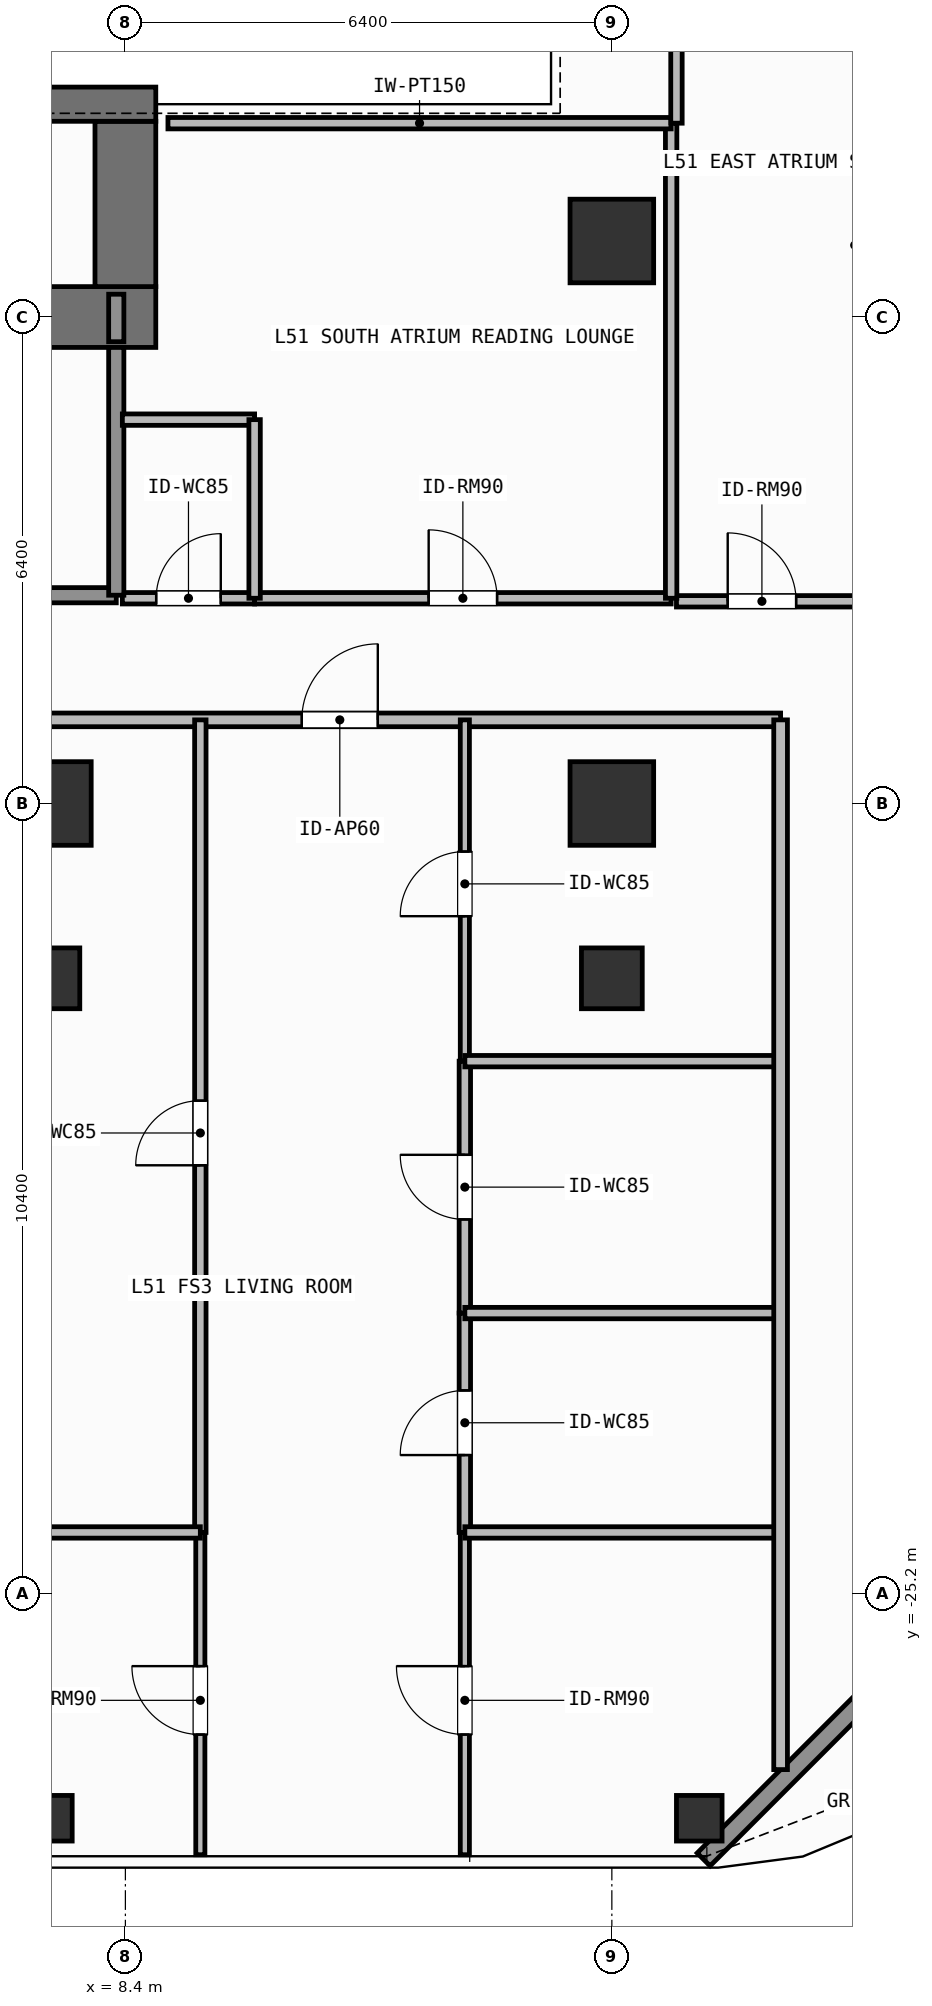
"""IFC4 building model, lengths in metres.
Left out: names, types, materials, properties, quantities, classifications, styles, units other than length and angle.
Written with IfcOpenShell. Run it as: python <this file> out.ifc"""

import sys

from ifc_helpers import new_model, si_unit, direction, frame, frame_2d, origin, origin_2d, place, context, subcontext, project, spatial, rectangle, hollow_rectangle, extrude, element, fill, save


model = new_model("IFC4")
c1 = context("Model", 3, precision=1e-05, world=origin(), true_north=direction((0.0, 1.0)))
c2 = subcontext(c1, "Body", "Model", "MODEL_VIEW")
j1 = project(units=[si_unit("LENGTHUNIT", "METRE"), si_unit("PLANEANGLEUNIT", "RADIAN")], contexts=[c1])
p1 = place(None, origin())
s1 = spatial("IfcSite", under=j1, at=p1, CompositionType="ELEMENT")
p2 = place(p1, origin())
s2 = spatial("IfcBuilding", under=s1, at=p2, CompositionType="ELEMENT")
p3 = place(p2, frame((0.0, 0.0, 207.0)))
s3 = spatial("IfcBuildingStorey", under=s2, at=p3, CompositionType="ELEMENT", Elevation=207.0)
p4 = place(p3, frame((6.12, -8.4, 0.0), z_axis=(0.0, 0.0, 1.0), x_axis=(1.0, 0.0, 0.0)))
e1 = element("IfcWall", 1, at=p4, inside=s3, PredefinedType="SHEAR", context=c2, shape_type="SweptSolid", body=[
    extrude(rectangle(XDim=2.68, YDim=0.8, at=frame_2d((1.34, 0.0))), origin(), (0.0, 0.0, 1.0), 3.9),
])
p5 = place(p3, frame((8.4, -8.0, 0.0), z_axis=(0.0, 0.0, 1.0), x_axis=(0.0, 1.0, 0.0)))
e2 = element("IfcWall", 2, at=p5, inside=s3, PredefinedType="SHEAR", context=c2, shape_type="SweptSolid", body=[
    extrude(rectangle(XDim=2.175, YDim=0.8, at=frame_2d((1.087, 0.0))), origin(), (0.0, 0.0, 1.0), 3.9),
])
p6 = place(p3, frame((3.045, -5.6, 0.0), z_axis=(0.0, 0.0, 1.0), x_axis=(1.0, 0.0, 0.0)))
e3 = element("IfcWall", 3, at=p6, inside=s3, PredefinedType="SHEAR", context=c2, shape_type="SweptSolid", body=[
    extrude(rectangle(XDim=5.755, YDim=0.45, at=frame_2d((2.877, 0.0))), origin(), (0.0, 0.0, 1.0), 3.9),
])
for number, where, z_axis, x_axis in (
    (4, (7.4, -14.8, 0.0), (0.0, 0.0, 1.0), (1.0, 0.0, 0.0)),
    (5, (14.8, -14.8, 0.0), (0.0, 0.0, 1.0), (1.0, 0.0, 0.0)),
    (6, (14.8, -7.4, 0.0), (0.0, 0.0, 1.0), (1.0, 0.0, 0.0)),
):
    element("IfcColumn", number, at=place(p3, frame(where, z_axis=z_axis, x_axis=x_axis)), inside=s3, PredefinedType="COLUMN", context=c2, shape_type="SweptSolid", body=[
        extrude(rectangle(XDim=1.1, YDim=1.1, at=origin_2d()), origin(), (0.0, 0.0, 1.0), 3.9),
    ])
for number, where, z_axis, x_axis in (
    (7, (7.4, -17.1, 0.0), (0.0, 0.0, 1.0), (1.0, 0.0, 0.0)),
    (8, (14.8, -17.1, 0.0), (0.0, 0.0, 1.0), (1.0, 0.0, 0.0)),
):
    element("IfcColumn", number, at=place(p3, frame(where, z_axis=z_axis, x_axis=x_axis)), inside=s3, PredefinedType="COLUMN", context=c2, shape_type="SweptSolid", body=[
        extrude(hollow_rectangle(XDim=0.8, YDim=0.8, WallThickness=0.036, at=origin_2d()), origin(), (0.0, 0.0, 1.0), 3.9),
    ])
for number, where, z_axis, x_axis in (
    (9, (15.95, -28.15, 0.0), (0.0, 0.0, 1.0), (1.0, 0.0, 0.0)),
    (10, (7.4, -28.15, 0.0), (0.0, 0.0, 1.0), (1.0, 0.0, 0.0)),
):
    element("IfcColumn", number, at=place(p3, frame(where, z_axis=z_axis, x_axis=x_axis)), inside=s3, PredefinedType="COLUMN", context=c2, shape_type="SweptSolid", body=[
        extrude(hollow_rectangle(XDim=0.6, YDim=0.6, WallThickness=0.028, at=origin_2d()), origin(), (0.0, 0.0, 1.0), 3.9),
    ])
p7 = place(p3, frame((20.392, -24.308, 0.0), z_axis=(0.0, 0.0, 1.0), x_axis=(-0.707106781187, -0.707106781187, 0.0)))
e11 = element("IfcWall", 11, at=p7, inside=s3, PredefinedType="SOLIDWALL", context=c2, shape_type="SweptSolid", body=[
    extrude(rectangle(XDim=6.201, YDim=0.24, at=frame_2d((3.101, 0.0))), origin(), (0.0, 0.0, 1.0), 3.62),
])
p8 = place(p3, frame((4.58, -12.06, 0.0), z_axis=(0.0, 0.0, 1.0), x_axis=(1.0, 0.0, 0.0)))
e12 = element("IfcWall", 12, at=p8, inside=s3, PredefinedType="SOLIDWALL", context=c2, shape_type="SweptSolid", body=[
    extrude(rectangle(XDim=3.7, YDim=0.2, at=frame_2d((1.85, 0.0))), origin(), (0.0, 0.0, 1.0), 3.62),
])
p9 = place(p8, frame((1.212, 0.0, 0.0)))
e13 = element("IfcOpeningElement", 13, at=p9, cuts=e12, PredefinedType="OPENING", context=c2, shape_type="SweptSolid", body=[
    extrude(rectangle(XDim=1.1, YDim=2.15, at=frame_2d((0.55, 1.075))), frame((0.0, 0.11, 0.0), z_axis=(0.0, -1.0, 0.0), x_axis=(1.0, 0.0, 0.0)), (0.0, 0.0, 1.0), 0.22),
])
p10 = place(p3, frame((8.36, -12.1, 0.0), z_axis=(0.0, 0.0, 1.0), x_axis=(1.0, 0.0, 0.0)))
e14 = element("IfcWall", 14, at=p10, inside=s3, PredefinedType="PARTITIONING", context=c2, shape_type="SweptSolid", body=[
    extrude(rectangle(XDim=1.74, YDim=0.15, at=frame_2d((0.87, 0.0))), origin(), (0.0, 0.0, 1.0), 3.62),
])
p11 = place(p10, frame((0.445, 0.0, 0.0)))
e15 = element("IfcOpeningElement", 15, at=p11, cuts=e14, PredefinedType="OPENING", context=c2, shape_type="SweptSolid", body=[
    extrude(rectangle(XDim=0.85, YDim=2.1, at=frame_2d((0.425, 1.05))), frame((0.0, 0.085, 0.0), z_axis=(0.0, -1.0, 0.0), x_axis=(1.0, 0.0, 0.0)), (0.0, 0.0, 1.0), 0.17),
])
p12 = place(p3, frame((10.1, -12.1, 0.0), z_axis=(0.0, 0.0, 1.0), x_axis=(1.0, 0.0, 0.0)))
e16 = element("IfcWall", 16, at=p12, inside=s3, PredefinedType="PARTITIONING", context=c2, shape_type="SweptSolid", body=[
    extrude(rectangle(XDim=5.48, YDim=0.15, at=frame_2d((2.74, 0.0))), origin(), (0.0, 0.0, 1.0), 3.62),
])
p13 = place(p12, frame((2.29, 0.0, 0.0)))
e17 = element("IfcOpeningElement", 17, at=p13, cuts=e16, PredefinedType="OPENING", context=c2, shape_type="SweptSolid", body=[
    extrude(rectangle(XDim=0.9, YDim=2.1, at=frame_2d((0.45, 1.05))), frame((0.0, 0.085, 0.0), z_axis=(0.0, -1.0, 0.0), x_axis=(1.0, 0.0, 0.0)), (0.0, 0.0, 1.0), 0.17),
])
p14 = place(p3, frame((5.599, -13.7, 0.0), z_axis=(0.0, 0.0, 1.0), x_axis=(1.0, 0.0, 0.0)))
e18 = element("IfcWall", 18, at=p14, inside=s3, PredefinedType="PARTITIONING", context=c2, shape_type="SweptSolid", body=[
    extrude(rectangle(XDim=11.421, YDim=0.18, at=frame_2d((5.71, 0.0))), origin(), (0.0, 0.0, 1.0), 3.62),
])
p15 = place(p14, frame((5.122, 0.0, 0.0)))
e19 = element("IfcOpeningElement", 19, at=p15, cuts=e18, PredefinedType="OPENING", context=c2, shape_type="SweptSolid", body=[
    extrude(rectangle(XDim=1.0, YDim=2.2, at=frame_2d((0.5, 1.1))), frame((0.0, 0.1, 0.0), z_axis=(0.0, -1.0, 0.0), x_axis=(1.0, 0.0, 0.0)), (0.0, 0.0, 1.0), 0.2),
])
p16 = place(p3, frame((9.386, -24.39, 0.0), z_axis=(0.0, 0.0, 1.0), x_axis=(0.0, 1.0, 0.0)))
e20 = element("IfcWall", 20, at=p16, inside=s3, PredefinedType="PARTITIONING", context=c2, shape_type="SweptSolid", body=[
    extrude(rectangle(XDim=10.69, YDim=0.15, at=frame_2d((5.345, 0.0))), origin(), (0.0, 0.0, 1.0), 3.62),
])
p17 = place(p16, frame((4.83, 0.0, 0.0)))
e21 = element("IfcOpeningElement", 21, at=p17, cuts=e20, PredefinedType="OPENING", context=c2, shape_type="SweptSolid", body=[
    extrude(rectangle(XDim=0.85, YDim=2.1, at=frame_2d((0.425, 1.05))), frame((0.0, 0.085, 0.0), z_axis=(0.0, -1.0, 0.0), x_axis=(1.0, 0.0, 0.0)), (0.0, 0.0, 1.0), 0.17),
])
p18 = place(p3, frame((9.386, -28.63, 0.0), z_axis=(0.0, 0.0, 1.0), x_axis=(0.0, 1.0, 0.0)))
e22 = element("IfcWall", 22, at=p18, inside=s3, PredefinedType="PARTITIONING", context=c2, shape_type="SweptSolid", body=[
    extrude(rectangle(XDim=4.24, YDim=0.12, at=frame_2d((2.12, 0.0))), origin(), (0.0, 0.0, 1.0), 3.62),
])
p19 = place(p18, frame((1.581, 0.0, 0.0)))
e23 = element("IfcOpeningElement", 23, at=p19, cuts=e22, PredefinedType="OPENING", context=c2, shape_type="SweptSolid", body=[
    extrude(rectangle(XDim=0.9, YDim=2.1, at=frame_2d((0.45, 1.05))), frame((0.0, 0.07, 0.0), z_axis=(0.0, -1.0, 0.0), x_axis=(1.0, 0.0, 0.0)), (0.0, 0.0, 1.0), 0.14),
])
p20 = place(p3, frame((12.866, -24.39, 0.0), z_axis=(0.0, 0.0, 1.0), x_axis=(0.0, 1.0, 0.0)))
e24 = element("IfcWall", 24, at=p20, inside=s3, PredefinedType="PARTITIONING", context=c2, shape_type="SweptSolid", body=[
    extrude(rectangle(XDim=2.886, YDim=0.15, at=frame_2d((1.443, 0.0))), origin(), (0.0, 0.0, 1.0), 3.62),
])
p21 = place(p20, frame((1.018, 0.0, 0.0)))
e25 = element("IfcOpeningElement", 25, at=p21, cuts=e24, PredefinedType="OPENING", context=c2, shape_type="SweptSolid", body=[
    extrude(rectangle(XDim=0.85, YDim=2.1, at=frame_2d((0.425, 1.05))), frame((0.0, 0.085, 0.0), z_axis=(0.0, -1.0, 0.0), x_axis=(1.0, 0.0, 0.0)), (0.0, 0.0, 1.0), 0.17),
])
p22 = place(p3, frame((12.866, -21.504, 0.0), z_axis=(0.0, 0.0, 1.0), x_axis=(0.0, 1.0, 0.0)))
e26 = element("IfcWall", 26, at=p22, inside=s3, PredefinedType="PARTITIONING", context=c2, shape_type="SweptSolid", body=[
    extrude(rectangle(XDim=3.314, YDim=0.15, at=frame_2d((1.657, 0.0))), origin(), (0.0, 0.0, 1.0), 3.62),
])
p23 = place(p22, frame((1.232, 0.0, 0.0)))
e27 = element("IfcOpeningElement", 27, at=p23, cuts=e26, PredefinedType="OPENING", context=c2, shape_type="SweptSolid", body=[
    extrude(rectangle(XDim=0.85, YDim=2.1, at=frame_2d((0.425, 1.05))), frame((0.0, 0.085, 0.0), z_axis=(0.0, -1.0, 0.0), x_axis=(1.0, 0.0, 0.0)), (0.0, 0.0, 1.0), 0.17),
])
p24 = place(p3, frame((12.866, -18.19, 0.0), z_axis=(0.0, 0.0, 1.0), x_axis=(0.0, 1.0, 0.0)))
e28 = element("IfcWall", 28, at=p24, inside=s3, PredefinedType="PARTITIONING", context=c2, shape_type="SweptSolid", body=[
    extrude(rectangle(XDim=4.49, YDim=0.12, at=frame_2d((2.245, 0.0))), origin(), (0.0, 0.0, 1.0), 3.62),
])
p25 = place(p24, frame((1.907, 0.0, 0.0)))
e29 = element("IfcOpeningElement", 29, at=p25, cuts=e28, PredefinedType="OPENING", context=c2, shape_type="SweptSolid", body=[
    extrude(rectangle(XDim=0.85, YDim=2.1, at=frame_2d((0.425, 1.05))), frame((0.0, 0.07, 0.0), z_axis=(0.0, -1.0, 0.0), x_axis=(1.0, 0.0, 0.0)), (0.0, 0.0, 1.0), 0.14),
])
p26 = place(p3, frame((12.866, -28.63, 0.0), z_axis=(0.0, 0.0, 1.0), x_axis=(0.0, 1.0, 0.0)))
e30 = element("IfcWall", 30, at=p26, inside=s3, PredefinedType="PARTITIONING", context=c2, shape_type="SweptSolid", body=[
    extrude(rectangle(XDim=4.24, YDim=0.12, at=frame_2d((2.12, 0.0))), origin(), (0.0, 0.0, 1.0), 3.62),
])
p27 = place(p26, frame((1.581, 0.0, 0.0)))
e31 = element("IfcOpeningElement", 31, at=p27, cuts=e30, PredefinedType="OPENING", context=c2, shape_type="SweptSolid", body=[
    extrude(rectangle(XDim=0.9, YDim=2.1, at=frame_2d((0.45, 1.05))), frame((0.0, 0.07, 0.0), z_axis=(0.0, -1.0, 0.0), x_axis=(1.0, 0.0, 0.0)), (0.0, 0.0, 1.0), 0.14),
])
p28 = place(p3, frame((15.65, -12.14, 0.0), z_axis=(0.0, 0.0, 1.0), x_axis=(1.0, 0.0, 0.0)))
e32 = element("IfcWall", 32, at=p28, inside=s3, PredefinedType="PARTITIONING", context=c2, shape_type="SweptSolid", body=[
    extrude(rectangle(XDim=2.42, YDim=0.15, at=frame_2d((1.21, 0.0))), origin(), (0.0, 0.0, 1.0), 3.62),
])
p29 = place(p28, frame((0.674, 0.0, 0.0)))
e33 = element("IfcOpeningElement", 33, at=p29, cuts=e32, PredefinedType="OPENING", context=c2, shape_type="SweptSolid", body=[
    extrude(rectangle(XDim=0.9, YDim=2.1, at=frame_2d((0.45, 1.05))), frame((0.0, 0.085, 0.0), z_axis=(0.0, -1.0, 0.0), x_axis=(1.0, 0.0, 0.0)), (0.0, 0.0, 1.0), 0.17),
])
p30 = place(p3, frame((8.28, -12.06, 0.0), z_axis=(0.0, 0.0, 1.0), x_axis=(0.0, 1.0, 0.0)))
e34 = element("IfcWall", 34, at=p30, inside=s3, PredefinedType="SOLIDWALL", context=c2, shape_type="SweptSolid", body=[
    extrude(rectangle(XDim=3.26, YDim=0.2, at=frame_2d((1.63, 0.0))), origin(), (0.0, 0.0, 1.0), 3.62),
])
p31 = place(p3, frame((8.28, -8.725, 0.0), z_axis=(0.0, 0.0, 1.0), x_axis=(0.0, 1.0, 0.0)))
e35 = element("IfcWall", 35, at=p31, inside=s3, PredefinedType="SOLIDWALL", context=c2, shape_type="SweptSolid", body=[
    extrude(rectangle(XDim=0.625, YDim=0.2, at=frame_2d((0.312, 0.0))), origin(), (0.0, 0.0, 1.0), 3.62),
])
p32 = place(p3, frame((8.36, -9.75, 0.0), z_axis=(0.0, 0.0, 1.0), x_axis=(1.0, 0.0, 0.0)))
e36 = element("IfcWall", 36, at=p32, inside=s3, PredefinedType="PARTITIONING", context=c2, shape_type="SweptSolid", body=[
    extrude(rectangle(XDim=1.74, YDim=0.15, at=frame_2d((0.87, 0.0))), origin(), (0.0, 0.0, 1.0), 3.62),
])
p33 = place(p3, frame((10.1, -12.1, 0.0), z_axis=(0.0, 0.0, 1.0), x_axis=(0.0, 1.0, 0.0)))
e37 = element("IfcWall", 37, at=p33, inside=s3, PredefinedType="PARTITIONING", context=c2, shape_type="SweptSolid", body=[
    extrude(rectangle(XDim=2.35, YDim=0.15, at=frame_2d((1.175, 0.0))), origin(), (0.0, 0.0, 1.0), 3.62),
])
p34 = place(p3, frame((15.58, -12.1, 0.0), z_axis=(0.0, 0.0, 1.0), x_axis=(0.0, 1.0, 0.0)))
e38 = element("IfcWall", 38, at=p34, inside=s3, PredefinedType="PARTITIONING", context=c2, shape_type="SweptSolid", body=[
    extrude(rectangle(XDim=6.25, YDim=0.15, at=frame_2d((3.125, 0.0))), origin(), (0.0, 0.0, 1.0), 3.62),
])
p35 = place(p3, frame((8.96, -5.85, 0.0), z_axis=(0.0, 0.0, 1.0), x_axis=(1.0, 0.0, 0.0)))
e39 = element("IfcWall", 39, at=p35, inside=s3, PredefinedType="PARTITIONING", context=c2, shape_type="SweptSolid", body=[
    extrude(rectangle(XDim=6.62, YDim=0.15, at=frame_2d((3.31, 0.0))), origin(), (0.0, 0.0, 1.0), 3.62),
])
p36 = place(p3, frame((5.599, -24.39, 0.0), z_axis=(0.0, 0.0, 1.0), x_axis=(1.0, 0.0, 0.0)))
e40 = element("IfcWall", 40, at=p36, inside=s3, PredefinedType="PARTITIONING", context=c2, shape_type="SweptSolid", body=[
    extrude(rectangle(XDim=3.787, YDim=0.15, at=frame_2d((1.894, 0.0))), origin(), (0.0, 0.0, 1.0), 3.62),
])
p37 = place(p3, frame((12.866, -21.504, 0.0), z_axis=(0.0, 0.0, 1.0), x_axis=(1.0, 0.0, 0.0)))
e41 = element("IfcWall", 41, at=p37, inside=s3, PredefinedType="PARTITIONING", context=c2, shape_type="SweptSolid", body=[
    extrude(rectangle(XDim=4.154, YDim=0.15, at=frame_2d((2.077, 0.0))), origin(), (0.0, 0.0, 1.0), 3.36),
])
for number, where, z_axis, x_axis in (
    (42, (12.866, -18.19, 0.0), (0.0, 0.0, 1.0), (1.0, 0.0, 0.0)),
    (43, (12.866, -24.39, 0.0), (0.0, 0.0, 1.0), (1.0, 0.0, 0.0)),
):
    element("IfcWall", number, at=place(p3, frame(where, z_axis=z_axis, x_axis=x_axis)), inside=s3, PredefinedType="PARTITIONING", context=c2, shape_type="SweptSolid", body=[
        extrude(rectangle(XDim=4.154, YDim=0.15, at=frame_2d((2.077, 0.0))), origin(), (0.0, 0.0, 1.0), 3.62),
    ])
p38 = place(p3, frame((17.02, -27.51, 0.0), z_axis=(0.0, 0.0, 1.0), x_axis=(0.0, 1.0, 0.0)))
e44 = element("IfcWall", 44, at=p38, inside=s3, PredefinedType="PARTITIONING", context=c2, shape_type="SweptSolid", body=[
    extrude(rectangle(XDim=13.81, YDim=0.18, at=frame_2d((6.905, 0.0))), origin(), (0.0, 0.0, 1.0), 3.62),
])
p39 = place(p3, frame((15.65, -5.85, 0.0), z_axis=(0.0, 0.0, 1.0), x_axis=(0.0, 1.0, 0.0)))
e45 = element("IfcWall", 45, at=p39, inside=s3, PredefinedType="PARTITIONING", context=c2, shape_type="SweptSolid", body=[
    extrude(rectangle(XDim=3.1, YDim=0.15, at=frame_2d((1.55, 0.0))), origin(), (0.0, 0.0, 1.0), 3.62),
])
p40 = place(p11, origin())
e46 = element("IfcDoor", 46, at=p40, inside=s3, OperationType="SINGLE_SWING_RIGHT", PredefinedType="DOOR", context=c2, shape_type="SweptSolid", body=[
    extrude(rectangle(XDim=0.85, YDim=2.1, at=frame_2d((0.425, 1.05))), frame((0.0, 0.025, 0.0), z_axis=(0.0, -1.0, 0.0), x_axis=(1.0, 0.0, 0.0)), (0.0, 0.0, 1.0), 0.05),
])
fill(e15, e46)
p41 = place(p13, origin())
e47 = element("IfcDoor", 47, at=p41, inside=s3, OperationType="SINGLE_SWING_LEFT", PredefinedType="DOOR", context=c2, shape_type="SweptSolid", body=[
    extrude(rectangle(XDim=0.9, YDim=2.1, at=frame_2d((0.45, 1.05))), frame((0.0, 0.025, 0.0), z_axis=(0.0, -1.0, 0.0), x_axis=(1.0, 0.0, 0.0)), (0.0, 0.0, 1.0), 0.05),
])
fill(e17, e47)
p42 = place(p15, origin())
e48 = element("IfcDoor", 48, at=p42, inside=s3, OperationType="SINGLE_SWING_RIGHT", PredefinedType="DOOR", context=c2, shape_type="SweptSolid", body=[
    extrude(rectangle(XDim=1.0, YDim=2.2, at=frame_2d((0.5, 1.1))), frame((0.0, 0.025, 0.0), z_axis=(0.0, -1.0, 0.0), x_axis=(1.0, 0.0, 0.0)), (0.0, 0.0, 1.0), 0.05),
])
fill(e19, e48)
p43 = place(p17, origin())
e49 = element("IfcDoor", 49, at=p43, inside=s3, OperationType="SINGLE_SWING_LEFT", PredefinedType="DOOR", context=c2, shape_type="SweptSolid", body=[
    extrude(rectangle(XDim=0.85, YDim=2.1, at=frame_2d((0.425, 1.05))), frame((0.0, 0.025, 0.0), z_axis=(0.0, -1.0, 0.0), x_axis=(1.0, 0.0, 0.0)), (0.0, 0.0, 1.0), 0.05),
])
fill(e21, e49)
p44 = place(p19, origin())
e50 = element("IfcDoor", 50, at=p44, inside=s3, OperationType="SINGLE_SWING_RIGHT", PredefinedType="DOOR", context=c2, shape_type="SweptSolid", body=[
    extrude(rectangle(XDim=0.9, YDim=2.1, at=frame_2d((0.45, 1.05))), frame((0.0, 0.025, 0.0), z_axis=(0.0, -1.0, 0.0), x_axis=(1.0, 0.0, 0.0)), (0.0, 0.0, 1.0), 0.05),
])
fill(e23, e50)
p45 = place(p21, origin())
e51 = element("IfcDoor", 51, at=p45, inside=s3, OperationType="SINGLE_SWING_LEFT", PredefinedType="DOOR", context=c2, shape_type="SweptSolid", body=[
    extrude(rectangle(XDim=0.85, YDim=2.1, at=frame_2d((0.425, 1.05))), frame((0.0, 0.025, 0.0), z_axis=(0.0, -1.0, 0.0), x_axis=(1.0, 0.0, 0.0)), (0.0, 0.0, 1.0), 0.05),
])
fill(e25, e51)
p46 = place(p23, origin())
e52 = element("IfcDoor", 52, at=p46, inside=s3, OperationType="SINGLE_SWING_RIGHT", PredefinedType="DOOR", context=c2, shape_type="SweptSolid", body=[
    extrude(rectangle(XDim=0.85, YDim=2.1, at=frame_2d((0.425, 1.05))), frame((0.0, 0.025, 0.0), z_axis=(0.0, -1.0, 0.0), x_axis=(1.0, 0.0, 0.0)), (0.0, 0.0, 1.0), 0.05),
])
fill(e27, e52)
p47 = place(p25, origin())
e53 = element("IfcDoor", 53, at=p47, inside=s3, OperationType="SINGLE_SWING_LEFT", PredefinedType="DOOR", context=c2, shape_type="SweptSolid", body=[
    extrude(rectangle(XDim=0.85, YDim=2.1, at=frame_2d((0.425, 1.05))), frame((0.0, 0.025, 0.0), z_axis=(0.0, -1.0, 0.0), x_axis=(1.0, 0.0, 0.0)), (0.0, 0.0, 1.0), 0.05),
])
fill(e29, e53)
p48 = place(p27, origin())
e54 = element("IfcDoor", 54, at=p48, inside=s3, OperationType="SINGLE_SWING_RIGHT", PredefinedType="DOOR", context=c2, shape_type="SweptSolid", body=[
    extrude(rectangle(XDim=0.9, YDim=2.1, at=frame_2d((0.45, 1.05))), frame((0.0, 0.025, 0.0), z_axis=(0.0, -1.0, 0.0), x_axis=(1.0, 0.0, 0.0)), (0.0, 0.0, 1.0), 0.05),
])
fill(e31, e54)
p49 = place(p29, origin())
e55 = element("IfcDoor", 55, at=p49, inside=s3, OperationType="SINGLE_SWING_LEFT", PredefinedType="DOOR", context=c2, shape_type="SweptSolid", body=[
    extrude(rectangle(XDim=0.9, YDim=2.1, at=frame_2d((0.45, 1.05))), frame((0.0, 0.025, 0.0), z_axis=(0.0, -1.0, 0.0), x_axis=(1.0, 0.0, 0.0)), (0.0, 0.0, 1.0), 0.05),
])
fill(e33, e55)
save(model, sys.argv[1])
